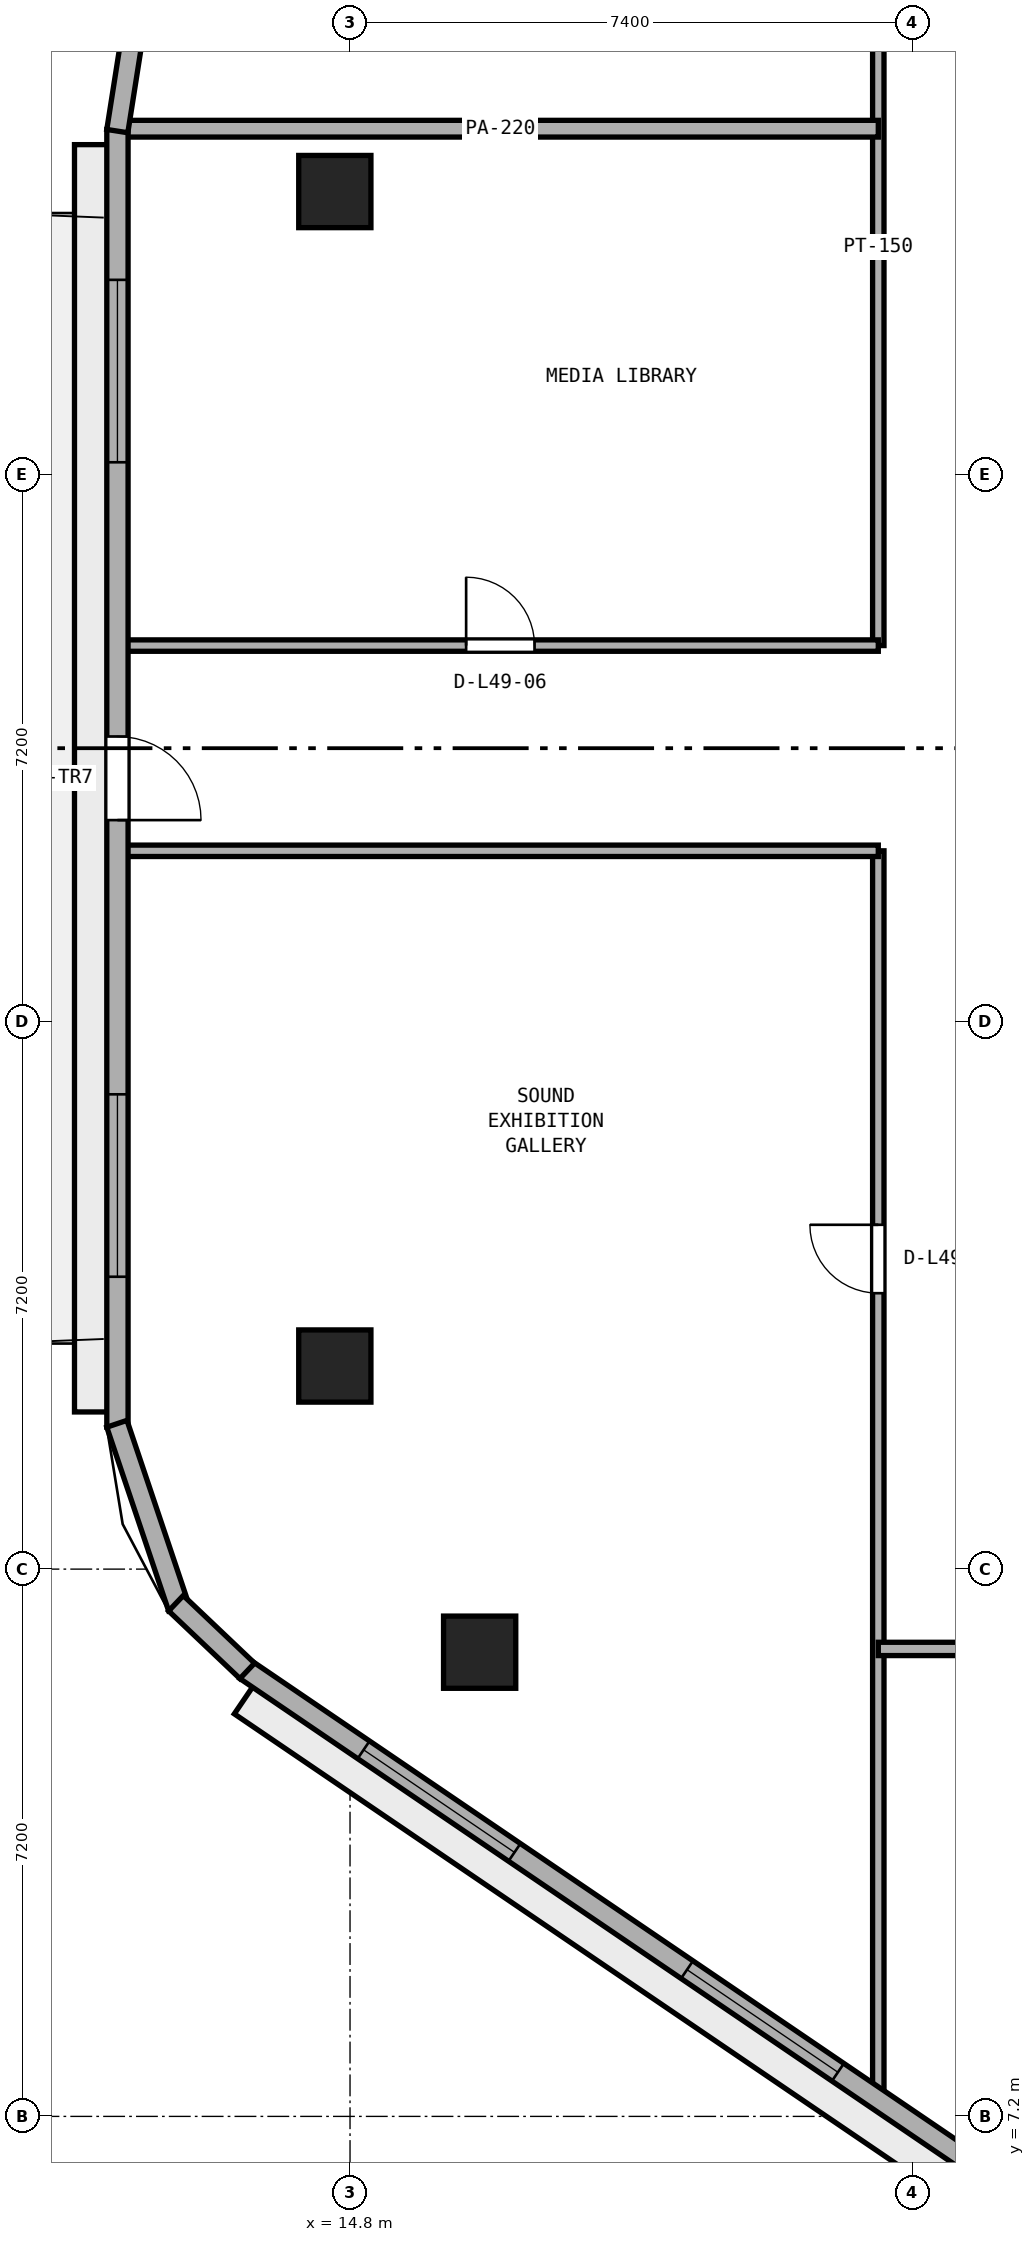
"""IFC4 building model, lengths in metres.
Left out: names, types, materials, properties, quantities, classifications, styles, units other than length and angle.
Written with IfcOpenShell. Run it as: python <this file> out.ifc"""

import sys

from ifc_helpers import new_model, si_unit, direction, frame, frame_2d, origin, origin_2d, place, context, subcontext, project, spatial, rectangle, extrude, element, fill, save


model = new_model("IFC4")
c1 = context("Model", 3, precision=1e-05, world=origin(), true_north=direction((0.0, 1.0)))
c2 = subcontext(c1, "Body", "Model", "MODEL_VIEW")
j1 = project(units=[si_unit("LENGTHUNIT", "METRE"), si_unit("PLANEANGLEUNIT", "RADIAN")], contexts=[c1])
p1 = place(None, origin())
s1 = spatial("IfcSite", under=j1, at=p1, CompositionType="ELEMENT")
p2 = place(p1, origin())
s2 = spatial("IfcBuilding", under=s1, at=p2, CompositionType="ELEMENT")
p3 = place(p2, frame((0.0, 0.0, 193.4)))
s3 = spatial("IfcBuildingStorey", under=s2, at=p3, CompositionType="ELEMENT", Elevation=193.4)
for number, where, z_axis, x_axis in (
    (1, (14.6, 32.523, 0.0), (0.0, 0.0, 1.0), (1.0, 0.0, 0.0)),
    (2, (14.6, 17.072, 0.0), (0.0, 0.0, 1.0), (1.0, 0.0, 0.0)),
    (3, (16.505, 13.307, 0.0), (0.0, 0.0, 1.0), (1.0, 0.0, 0.0)),
):
    element("IfcColumn", number, at=place(p3, frame(where, z_axis=z_axis, x_axis=x_axis)), inside=s3, PredefinedType="COLUMN", context=c2, shape_type="SweptSolid", body=[
        extrude(rectangle(XDim=0.95, YDim=0.95, at=origin_2d()), origin(), (0.0, 0.0, 1.0), 3.8),
    ])
p4 = place(p3, frame((21.75, 7.39, 0.0), z_axis=(0.0, 0.0, 1.0), x_axis=(0.0, 1.0, 0.0)))
e4 = element("IfcWall", 4, at=p4, inside=s3, PredefinedType="PARTITIONING", context=c2, shape_type="SweptSolid", body=[
    extrude(rectangle(XDim=16.46, YDim=0.15, at=frame_2d((8.23, 0.0))), origin(), (0.0, 0.0, 1.0), 3.54),
])
p5 = place(p4, frame((10.639, 0.0, 0.0)))
e5 = element("IfcOpeningElement", 5, at=p5, cuts=e4, PredefinedType="OPENING", context=c2, shape_type="SweptSolid", body=[
    extrude(rectangle(XDim=0.9, YDim=2.1, at=frame_2d((0.45, 1.05))), frame((0.0, 0.085, 0.0), z_axis=(0.0, -1.0, 0.0), x_axis=(1.0, 0.0, 0.0)), (0.0, 0.0, 1.0), 0.17),
])
p6 = place(p3, frame((21.75, 26.55, 0.0), z_axis=(0.0, 0.0, 1.0), x_axis=(0.0, 1.0, 0.0)))
e6 = element("IfcWall", 6, at=p6, inside=s3, PredefinedType="PARTITIONING", context=c2, shape_type="SweptSolid", body=[
    extrude(rectangle(XDim=10.5, YDim=0.15, at=frame_2d((5.25, 0.0))), origin(), (0.0, 0.0, 1.0), 3.54),
])
p7 = place(p3, frame((21.75, 13.35, 0.0), z_axis=(0.0, 0.0, 1.0), x_axis=(1.0, 0.0, 0.0)))
e7 = element("IfcWall", 7, at=p7, inside=s3, PredefinedType="PARTITIONING", context=c2, shape_type="SweptSolid", body=[
    extrude(rectangle(XDim=12.65, YDim=0.175, at=frame_2d((6.325, 0.0))), origin(), (0.0, 0.0, 1.0), 3.54),
])
p8 = place(p7, frame((3.895, 0.0, 0.0)))
e8 = element("IfcOpeningElement", 8, at=p8, cuts=e7, PredefinedType="OPENING", context=c2, shape_type="SweptSolid", body=[
    extrude(rectangle(XDim=0.9, YDim=2.1, at=frame_2d((0.45, 1.05))), frame((0.0, 0.097, 0.0), z_axis=(0.0, -1.0, 0.0), x_axis=(1.0, 0.0, 0.0)), (0.0, 0.0, 1.0), 0.195),
])
p9 = place(p7, frame((9.98, 0.0, 0.0)))
e9 = element("IfcOpeningElement", 9, at=p9, cuts=e7, PredefinedType="OPENING", context=c2, shape_type="SweptSolid", body=[
    extrude(rectangle(XDim=0.9, YDim=2.1, at=frame_2d((0.45, 1.05))), frame((0.0, 0.097, 0.0), z_axis=(0.0, -1.0, 0.0), x_axis=(1.0, 0.0, 0.0)), (0.0, 0.0, 1.0), 0.195),
])
p10 = place(p3, frame((11.805, 23.85, 0.0), z_axis=(0.0, 0.0, 1.0), x_axis=(1.0, 0.0, 0.0)))
e10 = element("IfcWall", 10, at=p10, inside=s3, PredefinedType="PARTITIONING", context=c2, shape_type="SweptSolid", body=[
    extrude(rectangle(XDim=9.945, YDim=0.15, at=frame_2d((4.973, 0.0))), origin(), (0.0, 0.0, 1.0), 3.54),
])
p11 = place(p3, frame((11.805, 26.55, 0.0), z_axis=(0.0, 0.0, 1.0), x_axis=(1.0, 0.0, 0.0)))
e11 = element("IfcWall", 11, at=p11, inside=s3, PredefinedType="PARTITIONING", context=c2, shape_type="SweptSolid", body=[
    extrude(rectangle(XDim=9.945, YDim=0.15, at=frame_2d((4.973, 0.0))), origin(), (0.0, 0.0, 1.0), 3.54),
])
p12 = place(p11, frame((4.522, 0.0, 0.0)))
e12 = element("IfcOpeningElement", 12, at=p12, cuts=e11, PredefinedType="OPENING", context=c2, shape_type="SweptSolid", body=[
    extrude(rectangle(XDim=0.9, YDim=2.1, at=frame_2d((0.45, 1.05))), frame((0.0, 0.085, 0.0), z_axis=(0.0, -1.0, 0.0), x_axis=(1.0, 0.0, 0.0)), (0.0, 0.0, 1.0), 0.17),
])
p13 = place(p3, frame((11.806, 33.35, 0.0), z_axis=(0.0, 0.0, 1.0), x_axis=(1.0, 0.0, 0.0)))
e13 = element("IfcWall", 13, at=p13, inside=s3, PredefinedType="PARTITIONING", context=c2, shape_type="SweptSolid", body=[
    extrude(rectangle(XDim=9.944, YDim=0.22, at=frame_2d((4.972, 0.0))), origin(), (0.0, 0.0, 1.0), 3.54),
])
p14 = place(p3, frame((11.74, 33.34, 0.0), z_axis=(0.0, 0.0, 1.0), x_axis=(0.0, -1.0, 0.0)))
e14 = element("IfcWall", 14, at=p14, inside=s3, PredefinedType="STANDARD", context=c2, shape_type="SweptSolid", body=[
    extrude(rectangle(XDim=17.073, YDim=0.28, at=frame_2d((8.536, 0.0))), origin(), (0.0, 0.0, 1.0), 3.54),
])
p15 = place(p14, frame((7.986, 0.0, 0.0)))
e15 = element("IfcOpeningElement", 15, at=p15, cuts=e14, PredefinedType="OPENING", context=c2, shape_type="SweptSolid", body=[
    extrude(rectangle(XDim=1.1, YDim=2.2, at=frame_2d((0.55, 1.1))), frame((0.0, 0.15, 0.0), z_axis=(0.0, -1.0, 0.0), x_axis=(1.0, 0.0, 0.0)), (0.0, 0.0, 1.0), 0.3),
])
p16 = place(p14, frame((1.979, 0.0, 0.9)))
e16 = element("IfcOpeningElement", 16, at=p16, cuts=e14, PredefinedType="OPENING", context=c2, shape_type="SweptSolid", body=[
    extrude(rectangle(XDim=2.4, YDim=1.75, at=frame_2d((1.2, 0.875))), frame((0.0, 0.15, 0.0), z_axis=(0.0, -1.0, 0.0), x_axis=(1.0, 0.0, 0.0)), (0.0, 0.0, 1.0), 0.3),
])
p17 = place(p14, frame((12.694, 0.0, 0.9)))
e17 = element("IfcOpeningElement", 17, at=p17, cuts=e14, PredefinedType="OPENING", context=c2, shape_type="SweptSolid", body=[
    extrude(rectangle(XDim=2.4, YDim=1.75, at=frame_2d((1.2, 0.875))), frame((0.0, 0.15, 0.0), z_axis=(0.0, -1.0, 0.0), x_axis=(1.0, 0.0, 0.0)), (0.0, 0.0, 1.0), 0.3),
])
p18 = place(p3, frame((13.43, 13.075, 0.0), z_axis=(0.0, 0.0, 1.0), x_axis=(0.827025402003, -0.562164552815, 0.0)))
e18 = element("IfcWall", 18, at=p18, inside=s3, PredefinedType="STANDARD", context=c2, shape_type="SweptSolid", body=[
    extrude(rectangle(XDim=16.435, YDim=0.28, at=frame_2d((8.218, 0.0))), origin(), (0.0, 0.0, 1.0), 3.54),
])
p19 = place(p18, frame((1.873, 0.0, 0.9)))
e19 = element("IfcOpeningElement", 19, at=p19, cuts=e18, PredefinedType="OPENING", context=c2, shape_type="SweptSolid", body=[
    extrude(rectangle(XDim=2.4, YDim=1.75, at=frame_2d((1.2, 0.875))), frame((0.0, 0.15, 0.0), z_axis=(0.0, -1.0, 0.0), x_axis=(1.0, 0.0, 0.0)), (0.0, 0.0, 1.0), 0.3),
])
p20 = place(p18, frame((7.018, 0.0, 0.9)))
e20 = element("IfcOpeningElement", 20, at=p20, cuts=e18, PredefinedType="OPENING", context=c2, shape_type="SweptSolid", body=[
    extrude(rectangle(XDim=2.4, YDim=1.75, at=frame_2d((1.2, 0.875))), frame((0.0, 0.15, 0.0), z_axis=(0.0, -1.0, 0.0), x_axis=(1.0, 0.0, 0.0)), (0.0, 0.0, 1.0), 0.3),
])
p21 = place(p18, frame((12.163, 0.0, 0.9)))
e21 = element("IfcOpeningElement", 21, at=p21, cuts=e18, PredefinedType="OPENING", context=c2, shape_type="SweptSolid", body=[
    extrude(rectangle(XDim=2.4, YDim=1.75, at=frame_2d((1.2, 0.875))), frame((0.0, 0.15, 0.0), z_axis=(0.0, -1.0, 0.0), x_axis=(1.0, 0.0, 0.0)), (0.0, 0.0, 1.0), 0.3),
])
p22 = place(p3, frame((11.932, 34.548, 0.0), z_axis=(0.0, 0.0, 1.0), x_axis=(-0.155519443181, -0.987832831401, 0.0)))
e22 = element("IfcWall", 22, at=p22, inside=s3, PredefinedType="STANDARD", context=c2, shape_type="SweptSolid", body=[
    extrude(rectangle(XDim=1.245, YDim=0.28, at=frame_2d((0.623, 0.0))), origin(), (0.0, 0.0, 1.0), 3.54),
])
p23 = place(p3, frame((11.733, 16.312, 0.0), z_axis=(0.0, 0.0, 1.0), x_axis=(0.318924860995, -0.947780002447, 0.0)))
e23 = element("IfcWall", 23, at=p23, inside=s3, PredefinedType="STANDARD", context=c2, shape_type="SweptSolid", body=[
    extrude(rectangle(XDim=2.552, YDim=0.28, at=frame_2d((1.276, 0.0))), origin(), (0.0, 0.0, 1.0), 3.54),
])
p24 = place(p3, frame((12.51, 13.951, 0.0), z_axis=(0.0, 0.0, 1.0), x_axis=(0.725371815671, -0.688357268451, 0.0)))
e24 = element("IfcWall", 24, at=p24, inside=s3, PredefinedType="STANDARD", context=c2, shape_type="SweptSolid", body=[
    extrude(rectangle(XDim=1.293, YDim=0.28, at=frame_2d((0.646, 0.0))), origin(), (0.0, 0.0, 1.0), 3.54),
])
p25 = place(p5, origin())
e25 = element("IfcDoor", 25, at=p25, inside=s3, OperationType="SINGLE_SWING_RIGHT", PredefinedType="DOOR", context=c2, shape_type="SweptSolid", body=[
    extrude(rectangle(XDim=0.9, YDim=2.1, at=frame_2d((0.45, 1.05))), frame((0.0, 0.025, 0.0), z_axis=(0.0, -1.0, 0.0), x_axis=(1.0, 0.0, 0.0)), (0.0, 0.0, 1.0), 0.05),
])
fill(e5, e25)
p26 = place(p12, origin())
e26 = element("IfcDoor", 26, at=p26, inside=s3, OperationType="SINGLE_SWING_LEFT", PredefinedType="DOOR", context=c2, shape_type="SweptSolid", body=[
    extrude(rectangle(XDim=0.9, YDim=2.1, at=frame_2d((0.45, 1.05))), frame((0.0, 0.025, 0.0), z_axis=(0.0, -1.0, 0.0), x_axis=(1.0, 0.0, 0.0)), (0.0, 0.0, 1.0), 0.05),
])
fill(e12, e26)
p27 = place(p15, origin())
e27 = element("IfcDoor", 27, at=p27, inside=s3, OperationType="SINGLE_SWING_RIGHT", PredefinedType="DOOR", context=c2, shape_type="SweptSolid", body=[
    extrude(rectangle(XDim=1.1, YDim=2.2, at=frame_2d((0.55, 1.1))), frame((0.0, 0.025, 0.0), z_axis=(0.0, -1.0, 0.0), x_axis=(1.0, 0.0, 0.0)), (0.0, 0.0, 1.0), 0.05),
])
fill(e15, e27)
p28 = place(p16, origin())
e28 = element("IfcWindow", 28, at=p28, inside=s3, PartitioningType="SINGLE_PANEL", PredefinedType="WINDOW", context=c2, shape_type="SweptSolid", body=[
    extrude(rectangle(XDim=2.4, YDim=1.75, at=frame_2d((1.2, 0.875))), frame((0.0, 0.03, 0.0), z_axis=(0.0, -1.0, 0.0), x_axis=(1.0, 0.0, 0.0)), (0.0, 0.0, 1.0), 0.06),
])
fill(e16, e28)
p29 = place(p17, origin())
e29 = element("IfcWindow", 29, at=p29, inside=s3, PartitioningType="SINGLE_PANEL", PredefinedType="WINDOW", context=c2, shape_type="SweptSolid", body=[
    extrude(rectangle(XDim=2.4, YDim=1.75, at=frame_2d((1.2, 0.875))), frame((0.0, 0.03, 0.0), z_axis=(0.0, -1.0, 0.0), x_axis=(1.0, 0.0, 0.0)), (0.0, 0.0, 1.0), 0.06),
])
fill(e17, e29)
p30 = place(p19, origin())
e30 = element("IfcWindow", 30, at=p30, inside=s3, PartitioningType="SINGLE_PANEL", PredefinedType="WINDOW", context=c2, shape_type="SweptSolid", body=[
    extrude(rectangle(XDim=2.4, YDim=1.75, at=frame_2d((1.2, 0.875))), frame((0.0, 0.03, 0.0), z_axis=(0.0, -1.0, 0.0), x_axis=(1.0, 0.0, 0.0)), (0.0, 0.0, 1.0), 0.06),
])
fill(e19, e30)
p31 = place(p20, origin())
e31 = element("IfcWindow", 31, at=p31, inside=s3, PartitioningType="SINGLE_PANEL", PredefinedType="WINDOW", context=c2, shape_type="SweptSolid", body=[
    extrude(rectangle(XDim=2.4, YDim=1.75, at=frame_2d((1.2, 0.875))), frame((0.0, 0.03, 0.0), z_axis=(0.0, -1.0, 0.0), x_axis=(1.0, 0.0, 0.0)), (0.0, 0.0, 1.0), 0.06),
])
fill(e20, e31)
save(model, sys.argv[1])
